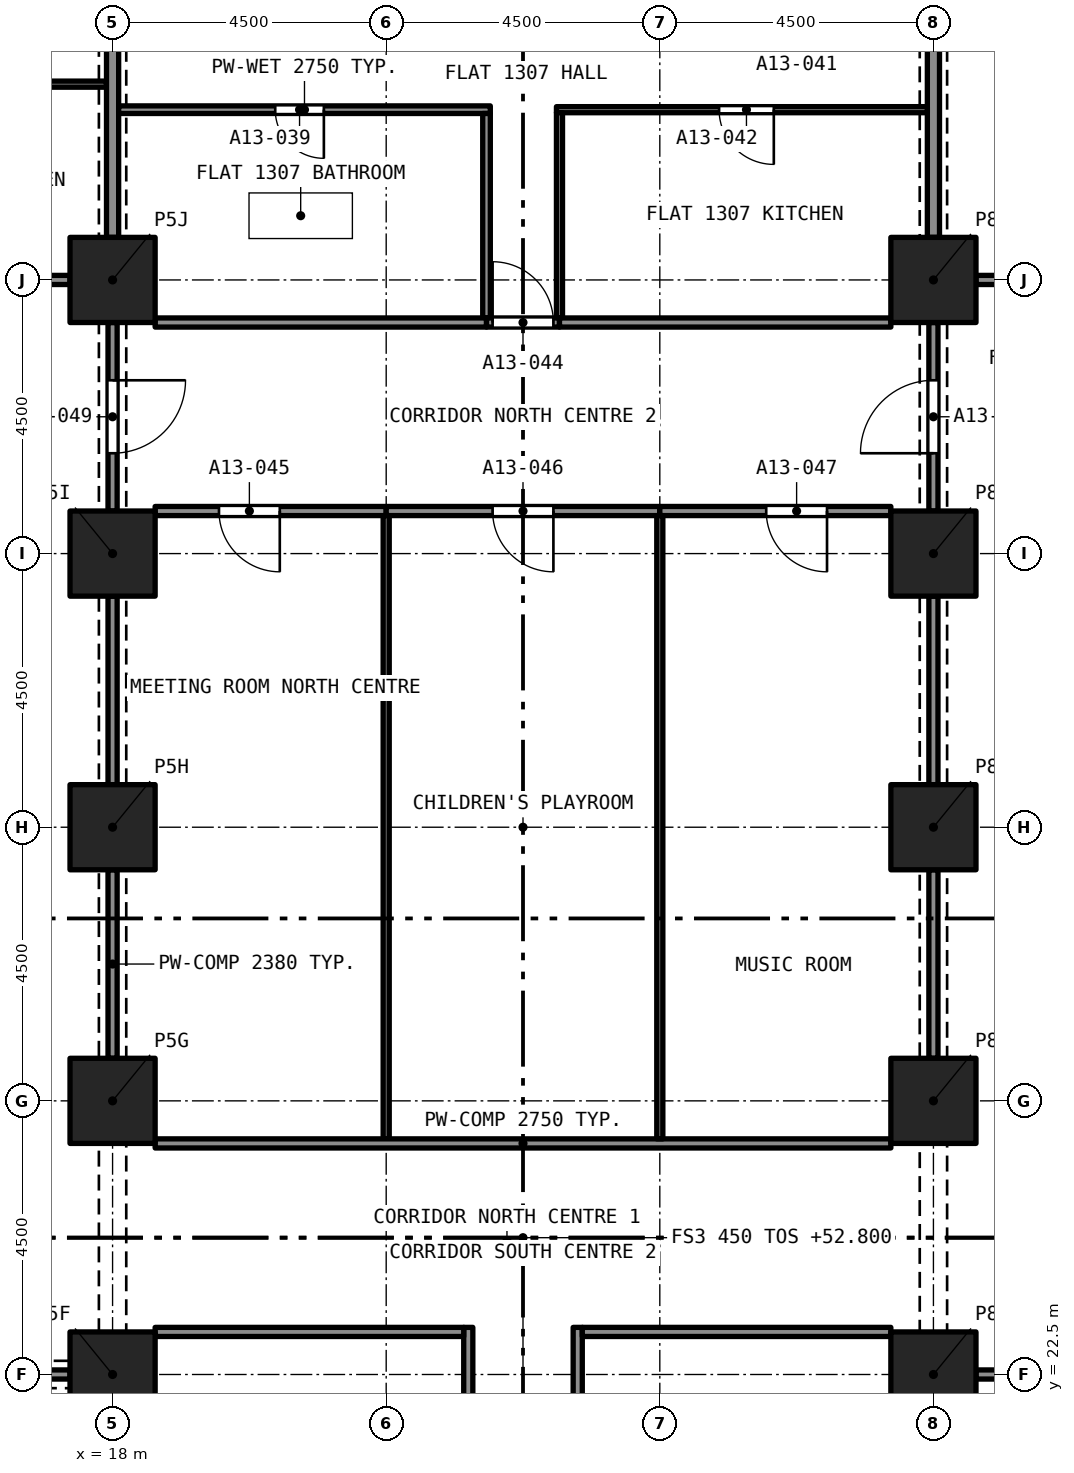
"""IFC4 building model, lengths in metres.
Left out: names, types, materials, properties, quantities, classifications, styles, units other than length and angle.
Written with IfcOpenShell. Run it as: python <this file> out.ifc"""

import sys

from ifc_helpers import new_model, si_unit, direction, frame, frame_2d, origin, origin_2d, place, context, subcontext, project, spatial, rectangle, extrude, element, fill, save


model = new_model("IFC4")
c1 = context("Model", 3, precision=1e-05, world=origin(), true_north=direction((0.0, 1.0)))
c2 = subcontext(c1, "Body", "Model", "MODEL_VIEW")
j1 = project(units=[si_unit("LENGTHUNIT", "METRE"), si_unit("PLANEANGLEUNIT", "RADIAN")], contexts=[c1])
p1 = place(None, origin())
s1 = spatial("IfcSite", under=j1, at=p1, CompositionType="ELEMENT")
p2 = place(p1, origin())
s2 = spatial("IfcBuilding", under=s1, at=p2, CompositionType="ELEMENT")
p3 = place(p2, frame((0.0, 0.0, 52.8)))
s3 = spatial("IfcBuildingStorey", under=s2, at=p3, CompositionType="ELEMENT", Elevation=52.8)
for number, where, z_axis, x_axis in (
    (1, (18.0, 22.5, 0.0), (0.0, 0.0, 1.0), (1.0, 0.0, 0.0)),
    (2, (31.5, 22.5, 0.0), (0.0, 0.0, 1.0), (1.0, 0.0, 0.0)),
    (3, (18.0, 27.0, 0.0), (0.0, 0.0, 1.0), (1.0, 0.0, 0.0)),
    (4, (31.5, 27.0, 0.0), (0.0, 0.0, 1.0), (1.0, 0.0, 0.0)),
    (5, (18.0, 31.5, 0.0), (0.0, 0.0, 1.0), (1.0, 0.0, 0.0)),
    (6, (31.5, 31.5, 0.0), (0.0, 0.0, 1.0), (1.0, 0.0, 0.0)),
    (7, (18.0, 36.0, 0.0), (0.0, 0.0, 1.0), (1.0, 0.0, 0.0)),
    (8, (31.5, 36.0, 0.0), (0.0, 0.0, 1.0), (1.0, 0.0, 0.0)),
    (9, (18.0, 40.5, 0.0), (0.0, 0.0, 1.0), (1.0, 0.0, 0.0)),
    (10, (31.5, 40.5, 0.0), (0.0, 0.0, 1.0), (1.0, 0.0, 0.0)),
):
    element("IfcColumn", number, at=place(p3, frame(where, z_axis=z_axis, x_axis=x_axis)), inside=s3, PredefinedType="COLUMN", context=c2, shape_type="SweptSolid", body=[
        extrude(rectangle(XDim=1.4, YDim=1.4, at=origin_2d()), origin(), (0.0, 0.0, 1.0), 3.2),
    ])
p4 = place(p3, frame((17.9, 43.72, 0.0), z_axis=(0.0, 0.0, 1.0), x_axis=(-1.0, 0.0, 0.0)))
e11 = element("IfcWall", 11, at=p4, inside=s3, PredefinedType="PARTITIONING", context=c2, shape_type="SweptSolid", body=[
    extrude(rectangle(XDim=6.255, YDim=0.1, at=frame_2d((3.127, 0.0))), origin(), (0.0, 0.0, 1.0), 2.9),
])
p5 = place(p4, frame((2.627, 0.0, 0.0)))
e12 = element("IfcOpeningElement", 12, at=p5, cuts=e11, PredefinedType="OPENING", context=c2, shape_type="SweptSolid", body=[
    extrude(rectangle(XDim=0.9, YDim=2.1, at=frame_2d((0.45, 1.05))), frame((0.0, 0.06, 0.0), z_axis=(0.0, -1.0, 0.0), x_axis=(1.0, 0.0, 0.0)), (0.0, 0.0, 1.0), 0.12),
])
p6 = place(p3, frame((18.0, 41.2, 0.0), z_axis=(0.0, 0.0, 1.0), x_axis=(0.0, 1.0, 0.0)))
e13 = element("IfcWall", 13, at=p6, inside=s3, PredefinedType="PARTITIONING", context=c2, shape_type="SweptSolid", body=[
    extrude(rectangle(XDim=3.1, YDim=0.2, at=frame_2d((1.55, 0.0))), origin(), (0.0, 0.0, 1.0), 2.38),
])
p7 = place(p3, frame((13.5, 40.5, 0.0), z_axis=(0.0, 0.0, 1.0), x_axis=(1.0, 0.0, 0.0)))
e14 = element("IfcWall", 14, at=p7, inside=s3, PredefinedType="PARTITIONING", context=c2, shape_type="SweptSolid", body=[
    extrude(rectangle(XDim=3.8, YDim=0.15, at=frame_2d((1.9, 0.0))), origin(), (0.0, 0.0, 1.0), 2.9),
])
p8 = place(p3, frame((31.5, 41.2, 0.0), z_axis=(0.0, 0.0, 1.0), x_axis=(0.0, 1.0, 0.0)))
e15 = element("IfcWall", 15, at=p8, inside=s3, PredefinedType="PARTITIONING", context=c2, shape_type="SweptSolid", body=[
    extrude(rectangle(XDim=3.1, YDim=0.2, at=frame_2d((1.55, 0.0))), origin(), (0.0, 0.0, 1.0), 2.38),
])
p9 = place(p3, frame((32.2, 40.5, 0.0), z_axis=(0.0, 0.0, 1.0), x_axis=(1.0, 0.0, 0.0)))
e16 = element("IfcWall", 16, at=p9, inside=s3, PredefinedType="PARTITIONING", context=c2, shape_type="SweptSolid", body=[
    extrude(rectangle(XDim=2.15, YDim=0.15, at=frame_2d((1.075, 0.0))), origin(), (0.0, 0.0, 1.0), 2.9),
])
p10 = place(p9, frame((1.02, 0.0, 0.0)))
e17 = element("IfcOpeningElement", 17, at=p10, cuts=e16, PredefinedType="OPENING", context=c2, shape_type="SweptSolid", body=[
    extrude(rectangle(XDim=1.0, YDim=2.1, at=frame_2d((0.5, 1.05))), frame((0.0, 0.085, 0.0), z_axis=(0.0, -1.0, 0.0), x_axis=(1.0, 0.0, 0.0)), (0.0, 0.0, 1.0), 0.17),
])
p11 = place(p3, frame((24.212, 43.3, 0.0), z_axis=(0.0, 0.0, 1.0), x_axis=(-1.0, 0.0, 0.0)))
e18 = element("IfcWall", 18, at=p11, inside=s3, PredefinedType="PARTITIONING", context=c2, shape_type="SweptSolid", body=[
    extrude(rectangle(XDim=6.112, YDim=0.125, at=frame_2d((3.056, 0.0))), origin(), (0.0, 0.0, 1.0), 2.75),
])
p12 = place(p11, frame((2.738, 0.0, 0.0)))
e19 = element("IfcOpeningElement", 19, at=p12, cuts=e18, PredefinedType="OPENING", context=c2, shape_type="SweptSolid", body=[
    extrude(rectangle(XDim=0.8, YDim=2.1, at=frame_2d((0.4, 1.05))), frame((0.0, 0.073, 0.0), z_axis=(0.0, -1.0, 0.0), x_axis=(1.0, 0.0, 0.0)), (0.0, 0.0, 1.0), 0.145),
])
p13 = place(p3, frame((24.15, 39.875, 0.0), z_axis=(0.0, 0.0, 1.0), x_axis=(0.0, 1.0, 0.0)))
e20 = element("IfcWall", 20, at=p13, inside=s3, PredefinedType="PARTITIONING", context=c2, shape_type="SweptSolid", body=[
    extrude(rectangle(XDim=3.363, YDim=0.125, at=frame_2d((1.681, 0.0))), origin(), (0.0, 0.0, 1.0), 2.75),
])
p14 = place(p3, frame((18.7, 39.8, 0.0), z_axis=(0.0, 0.0, 1.0), x_axis=(1.0, 0.0, 0.0)))
e21 = element("IfcWall", 21, at=p14, inside=s3, PredefinedType="PARTITIONING", context=c2, shape_type="SweptSolid", body=[
    extrude(rectangle(XDim=5.45, YDim=0.15, at=frame_2d((2.725, 0.0))), origin(), (0.0, 0.0, 1.0), 2.75),
])
p15 = place(p3, frame((31.4, 43.3, 0.0), z_axis=(0.0, 0.0, 1.0), x_axis=(-1.0, 0.0, 0.0)))
e22 = element("IfcWall", 22, at=p15, inside=s3, PredefinedType="PARTITIONING", context=c2, shape_type="SweptSolid", body=[
    extrude(rectangle(XDim=6.1, YDim=0.1, at=frame_2d((3.05, 0.0))), origin(), (0.0, 0.0, 1.0), 2.75),
])
p16 = place(p15, frame((2.525, 0.0, 0.0)))
e23 = element("IfcOpeningElement", 23, at=p16, cuts=e22, PredefinedType="OPENING", context=c2, shape_type="SweptSolid", body=[
    extrude(rectangle(XDim=0.9, YDim=2.1, at=frame_2d((0.45, 1.05))), frame((0.0, 0.06, 0.0), z_axis=(0.0, -1.0, 0.0), x_axis=(1.0, 0.0, 0.0)), (0.0, 0.0, 1.0), 0.12),
])
p17 = place(p3, frame((25.35, 39.875, 0.0), z_axis=(0.0, 0.0, 1.0), x_axis=(0.0, 1.0, 0.0)))
e24 = element("IfcWall", 24, at=p17, inside=s3, PredefinedType="PARTITIONING", context=c2, shape_type="SweptSolid", body=[
    extrude(rectangle(XDim=3.375, YDim=0.1, at=frame_2d((1.688, 0.0))), origin(), (0.0, 0.0, 1.0), 2.75),
])
p18 = place(p3, frame((24.15, 39.8, 0.0), z_axis=(0.0, 0.0, 1.0), x_axis=(1.0, 0.0, 0.0)))
e25 = element("IfcWall", 25, at=p18, inside=s3, PredefinedType="PARTITIONING", context=c2, shape_type="SweptSolid", body=[
    extrude(rectangle(XDim=1.2, YDim=0.15, at=frame_2d((0.6, 0.0))), origin(), (0.0, 0.0, 1.0), 2.75),
])
p19 = place(p18, frame((0.1, 0.0, 0.0)))
e26 = element("IfcOpeningElement", 26, at=p19, cuts=e25, PredefinedType="OPENING", context=c2, shape_type="SweptSolid", body=[
    extrude(rectangle(XDim=1.0, YDim=2.1, at=frame_2d((0.5, 1.05))), frame((0.0, 0.085, 0.0), z_axis=(0.0, -1.0, 0.0), x_axis=(1.0, 0.0, 0.0)), (0.0, 0.0, 1.0), 0.17),
])
p20 = place(p3, frame((25.35, 39.8, 0.0), z_axis=(0.0, 0.0, 1.0), x_axis=(1.0, 0.0, 0.0)))
e27 = element("IfcWall", 27, at=p20, inside=s3, PredefinedType="PARTITIONING", context=c2, shape_type="SweptSolid", body=[
    extrude(rectangle(XDim=5.45, YDim=0.15, at=frame_2d((2.725, 0.0))), origin(), (0.0, 0.0, 1.0), 2.75),
])
p21 = place(p3, frame((22.5, 36.7, 0.0), z_axis=(0.0, 0.0, 1.0), x_axis=(-1.0, 0.0, 0.0)))
e28 = element("IfcWall", 28, at=p21, inside=s3, PredefinedType="PARTITIONING", context=c2, shape_type="SweptSolid", body=[
    extrude(rectangle(XDim=3.8, YDim=0.15, at=frame_2d((1.9, 0.0))), origin(), (0.0, 0.0, 1.0), 2.75),
])
p22 = place(p21, frame((1.75, 0.0, 0.0)))
e29 = element("IfcOpeningElement", 29, at=p22, cuts=e28, PredefinedType="OPENING", context=c2, shape_type="SweptSolid", body=[
    extrude(rectangle(XDim=1.0, YDim=2.1, at=frame_2d((0.5, 1.05))), frame((0.0, 0.085, 0.0), z_axis=(0.0, -1.0, 0.0), x_axis=(1.0, 0.0, 0.0)), (0.0, 0.0, 1.0), 0.17),
])
p23 = place(p3, frame((27.0, 36.7, 0.0), z_axis=(0.0, 0.0, 1.0), x_axis=(-1.0, 0.0, 0.0)))
e30 = element("IfcWall", 30, at=p23, inside=s3, PredefinedType="PARTITIONING", context=c2, shape_type="SweptSolid", body=[
    extrude(rectangle(XDim=4.5, YDim=0.15, at=frame_2d((2.25, 0.0))), origin(), (0.0, 0.0, 1.0), 2.75),
])
p24 = place(p23, frame((1.75, 0.0, 0.0)))
e31 = element("IfcOpeningElement", 31, at=p24, cuts=e30, PredefinedType="OPENING", context=c2, shape_type="SweptSolid", body=[
    extrude(rectangle(XDim=1.0, YDim=2.1, at=frame_2d((0.5, 1.05))), frame((0.0, 0.085, 0.0), z_axis=(0.0, -1.0, 0.0), x_axis=(1.0, 0.0, 0.0)), (0.0, 0.0, 1.0), 0.17),
])
p25 = place(p3, frame((30.8, 36.7, 0.0), z_axis=(0.0, 0.0, 1.0), x_axis=(-1.0, 0.0, 0.0)))
e32 = element("IfcWall", 32, at=p25, inside=s3, PredefinedType="PARTITIONING", context=c2, shape_type="SweptSolid", body=[
    extrude(rectangle(XDim=3.8, YDim=0.15, at=frame_2d((1.9, 0.0))), origin(), (0.0, 0.0, 1.0), 2.75),
])
p26 = place(p25, frame((1.05, 0.0, 0.0)))
e33 = element("IfcOpeningElement", 33, at=p26, cuts=e32, PredefinedType="OPENING", context=c2, shape_type="SweptSolid", body=[
    extrude(rectangle(XDim=1.0, YDim=2.1, at=frame_2d((0.5, 1.05))), frame((0.0, 0.085, 0.0), z_axis=(0.0, -1.0, 0.0), x_axis=(1.0, 0.0, 0.0)), (0.0, 0.0, 1.0), 0.17),
])
p27 = place(p3, frame((31.5, 36.7, 0.0), z_axis=(0.0, 0.0, 1.0), x_axis=(0.0, 1.0, 0.0)))
e34 = element("IfcWall", 34, at=p27, inside=s3, PredefinedType="PARTITIONING", context=c2, shape_type="SweptSolid", body=[
    extrude(rectangle(XDim=3.1, YDim=0.15, at=frame_2d((1.55, 0.0))), origin(), (0.0, 0.0, 1.0), 2.38),
])
p28 = place(p27, frame((0.95, 0.0, 0.0)))
e35 = element("IfcOpeningElement", 35, at=p28, cuts=e34, PredefinedType="OPENING", context=c2, shape_type="SweptSolid", body=[
    extrude(rectangle(XDim=1.2, YDim=2.1, at=frame_2d((0.6, 1.05))), frame((0.0, 0.085, 0.0), z_axis=(0.0, -1.0, 0.0), x_axis=(1.0, 0.0, 0.0)), (0.0, 0.0, 1.0), 0.17),
])
p29 = place(p3, frame((18.0, 39.8, 0.0), z_axis=(0.0, 0.0, 1.0), x_axis=(0.0, -1.0, 0.0)))
e36 = element("IfcWall", 36, at=p29, inside=s3, PredefinedType="PARTITIONING", context=c2, shape_type="SweptSolid", body=[
    extrude(rectangle(XDim=3.1, YDim=0.15, at=frame_2d((1.55, 0.0))), origin(), (0.0, 0.0, 1.0), 2.38),
])
p30 = place(p29, frame((0.95, 0.0, 0.0)))
e37 = element("IfcOpeningElement", 37, at=p30, cuts=e36, PredefinedType="OPENING", context=c2, shape_type="SweptSolid", body=[
    extrude(rectangle(XDim=1.2, YDim=2.1, at=frame_2d((0.6, 1.05))), frame((0.0, 0.085, 0.0), z_axis=(0.0, -1.0, 0.0), x_axis=(1.0, 0.0, 0.0)), (0.0, 0.0, 1.0), 0.17),
])
p31 = place(p3, frame((23.85, 17.225, 0.0), z_axis=(0.0, 0.0, 1.0), x_axis=(0.0, 1.0, 0.0)))
e38 = element("IfcWall", 38, at=p31, inside=s3, PredefinedType="PARTITIONING", context=c2, shape_type="SweptSolid", body=[
    extrude(rectangle(XDim=6.05, YDim=0.15, at=frame_2d((3.025, 0.0))), origin(), (0.0, 0.0, 1.0), 2.75),
])
p32 = place(p31, frame((2.525, 0.0, 0.0)))
e39 = element("IfcOpeningElement", 39, at=p32, cuts=e38, PredefinedType="OPENING", context=c2, shape_type="SweptSolid", body=[
    extrude(rectangle(XDim=1.0, YDim=2.1, at=frame_2d((0.5, 1.05))), frame((0.0, 0.085, 0.0), z_axis=(0.0, -1.0, 0.0), x_axis=(1.0, 0.0, 0.0)), (0.0, 0.0, 1.0), 0.17),
])
p33 = place(p3, frame((25.65, 23.275, 0.0), z_axis=(0.0, 0.0, 1.0), x_axis=(0.0, -1.0, 0.0)))
e40 = element("IfcWall", 40, at=p33, inside=s3, PredefinedType="PARTITIONING", context=c2, shape_type="SweptSolid", body=[
    extrude(rectangle(XDim=6.05, YDim=0.15, at=frame_2d((3.025, 0.0))), origin(), (0.0, 0.0, 1.0), 2.75),
])
p34 = place(p33, frame((2.525, 0.0, 0.0)))
e41 = element("IfcOpeningElement", 41, at=p34, cuts=e40, PredefinedType="OPENING", context=c2, shape_type="SweptSolid", body=[
    extrude(rectangle(XDim=1.0, YDim=2.1, at=frame_2d((0.5, 1.05))), frame((0.0, 0.085, 0.0), z_axis=(0.0, -1.0, 0.0), x_axis=(1.0, 0.0, 0.0)), (0.0, 0.0, 1.0), 0.17),
])
p35 = place(p3, frame((22.5, 26.375, 0.0), z_axis=(0.0, 0.0, 1.0), x_axis=(0.0, 1.0, 0.0)))
e42 = element("IfcWall", 42, at=p35, inside=s3, PredefinedType="PARTITIONING", context=c2, shape_type="SweptSolid", body=[
    extrude(rectangle(XDim=10.25, YDim=0.1, at=frame_2d((5.125, 0.0))), origin(), (0.0, 0.0, 1.0), 2.75),
])
for number, where, z_axis, x_axis in (
    (43, (18.0, 27.7, 0.0), (0.0, 0.0, 1.0), (0.0, 1.0, 0.0)),
    (44, (18.0, 32.2, 0.0), (0.0, 0.0, 1.0), (0.0, 1.0, 0.0)),
):
    element("IfcWall", number, at=place(p3, frame(where, z_axis=z_axis, x_axis=x_axis)), inside=s3, PredefinedType="PARTITIONING", context=c2, shape_type="SweptSolid", body=[
        extrude(rectangle(XDim=3.1, YDim=0.15, at=frame_2d((1.55, 0.0))), origin(), (0.0, 0.0, 1.0), 2.38),
    ])
p36 = place(p3, frame((18.7, 26.3, 0.0), z_axis=(0.0, 0.0, 1.0), x_axis=(1.0, 0.0, 0.0)))
e45 = element("IfcWall", 45, at=p36, inside=s3, PredefinedType="PARTITIONING", context=c2, shape_type="SweptSolid", body=[
    extrude(rectangle(XDim=12.1, YDim=0.15, at=frame_2d((6.05, 0.0))), origin(), (0.0, 0.0, 1.0), 2.75),
])
p37 = place(p3, frame((27.0, 26.375, 0.0), z_axis=(0.0, 0.0, 1.0), x_axis=(0.0, 1.0, 0.0)))
e46 = element("IfcWall", 46, at=p37, inside=s3, PredefinedType="PARTITIONING", context=c2, shape_type="SweptSolid", body=[
    extrude(rectangle(XDim=10.25, YDim=0.1, at=frame_2d((5.125, 0.0))), origin(), (0.0, 0.0, 1.0), 2.75),
])
for number, where, z_axis, x_axis in (
    (47, (31.5, 32.2, 0.0), (0.0, 0.0, 1.0), (0.0, 1.0, 0.0)),
    (48, (31.5, 27.7, 0.0), (0.0, 0.0, 1.0), (0.0, 1.0, 0.0)),
):
    element("IfcWall", number, at=place(p3, frame(where, z_axis=z_axis, x_axis=x_axis)), inside=s3, PredefinedType="PARTITIONING", context=c2, shape_type="SweptSolid", body=[
        extrude(rectangle(XDim=3.1, YDim=0.15, at=frame_2d((1.55, 0.0))), origin(), (0.0, 0.0, 1.0), 2.38),
    ])
for number, where, z_axis, x_axis in (
    (49, (18.7, 23.2, 0.0), (0.0, 0.0, 1.0), (1.0, 0.0, 0.0)),
    (50, (25.725, 23.2, 0.0), (0.0, 0.0, 1.0), (1.0, 0.0, 0.0)),
):
    element("IfcWall", number, at=place(p3, frame(where, z_axis=z_axis, x_axis=x_axis)), inside=s3, PredefinedType="PARTITIONING", context=c2, shape_type="SweptSolid", body=[
        extrude(rectangle(XDim=5.075, YDim=0.15, at=frame_2d((2.538, 0.0))), origin(), (0.0, 0.0, 1.0), 2.75),
    ])
p38 = place(p3, frame((32.2, 22.5, 0.0), z_axis=(0.0, 0.0, 1.0), x_axis=(1.0, 0.0, 0.0)))
e51 = element("IfcWall", 51, at=p38, inside=s3, PredefinedType="PARTITIONING", context=c2, shape_type="SweptSolid", body=[
    extrude(rectangle(XDim=9.725, YDim=0.15, at=frame_2d((4.863, 0.0))), origin(), (0.0, 0.0, 1.0), 2.9),
])
p39 = place(p3, frame((14.2, 22.5, 0.0), z_axis=(0.0, 0.0, 1.0), x_axis=(1.0, 0.0, 0.0)))
e52 = element("IfcWall", 52, at=p39, inside=s3, PredefinedType="PARTITIONING", context=c2, shape_type="SweptSolid", body=[
    extrude(rectangle(XDim=3.1, YDim=0.15, at=frame_2d((1.55, 0.0))), origin(), (0.0, 0.0, 1.0), 2.38),
])
p40 = place(p12, origin())
e53 = element("IfcDoor", 53, at=p40, inside=s3, OperationType="SINGLE_SWING_RIGHT", PredefinedType="DOOR", context=c2, shape_type="SweptSolid", body=[
    extrude(rectangle(XDim=0.8, YDim=2.1, at=frame_2d((0.4, 1.05))), frame((0.0, 0.025, 0.0), z_axis=(0.0, -1.0, 0.0), x_axis=(1.0, 0.0, 0.0)), (0.0, 0.0, 1.0), 0.05),
])
fill(e19, e53)
p41 = place(p16, origin())
e54 = element("IfcDoor", 54, at=p41, inside=s3, OperationType="SINGLE_SWING_LEFT", PredefinedType="DOOR", context=c2, shape_type="SweptSolid", body=[
    extrude(rectangle(XDim=0.9, YDim=2.1, at=frame_2d((0.45, 1.05))), frame((0.0, 0.025, 0.0), z_axis=(0.0, -1.0, 0.0), x_axis=(1.0, 0.0, 0.0)), (0.0, 0.0, 1.0), 0.05),
])
fill(e23, e54)
p42 = place(p19, origin())
e55 = element("IfcDoor", 55, at=p42, inside=s3, OperationType="SINGLE_SWING_RIGHT", PredefinedType="DOOR", context=c2, shape_type="SweptSolid", body=[
    extrude(rectangle(XDim=1.0, YDim=2.1, at=frame_2d((0.5, 1.05))), frame((0.0, 0.025, 0.0), z_axis=(0.0, -1.0, 0.0), x_axis=(1.0, 0.0, 0.0)), (0.0, 0.0, 1.0), 0.05),
])
fill(e26, e55)
p43 = place(p22, origin())
e56 = element("IfcDoor", 56, at=p43, inside=s3, OperationType="SINGLE_SWING_RIGHT", PredefinedType="DOOR", context=c2, shape_type="SweptSolid", body=[
    extrude(rectangle(XDim=1.0, YDim=2.1, at=frame_2d((0.5, 1.05))), frame((0.0, 0.025, 0.0), z_axis=(0.0, -1.0, 0.0), x_axis=(1.0, 0.0, 0.0)), (0.0, 0.0, 1.0), 0.05),
])
fill(e29, e56)
p44 = place(p24, origin())
e57 = element("IfcDoor", 57, at=p44, inside=s3, OperationType="SINGLE_SWING_RIGHT", PredefinedType="DOOR", context=c2, shape_type="SweptSolid", body=[
    extrude(rectangle(XDim=1.0, YDim=2.1, at=frame_2d((0.5, 1.05))), frame((0.0, 0.025, 0.0), z_axis=(0.0, -1.0, 0.0), x_axis=(1.0, 0.0, 0.0)), (0.0, 0.0, 1.0), 0.05),
])
fill(e31, e57)
p45 = place(p26, origin())
e58 = element("IfcDoor", 58, at=p45, inside=s3, OperationType="SINGLE_SWING_LEFT", PredefinedType="DOOR", context=c2, shape_type="SweptSolid", body=[
    extrude(rectangle(XDim=1.0, YDim=2.1, at=frame_2d((0.5, 1.05))), frame((0.0, 0.025, 0.0), z_axis=(0.0, -1.0, 0.0), x_axis=(1.0, 0.0, 0.0)), (0.0, 0.0, 1.0), 0.05),
])
fill(e33, e58)
p46 = place(p28, origin())
e59 = element("IfcDoor", 59, at=p46, inside=s3, OperationType="SINGLE_SWING_LEFT", PredefinedType="DOOR", context=c2, shape_type="SweptSolid", body=[
    extrude(rectangle(XDim=1.2, YDim=2.1, at=frame_2d((0.6, 1.05))), frame((0.0, 0.025, 0.0), z_axis=(0.0, -1.0, 0.0), x_axis=(1.0, 0.0, 0.0)), (0.0, 0.0, 1.0), 0.05),
])
fill(e35, e59)
p47 = place(p30, origin())
e60 = element("IfcDoor", 60, at=p47, inside=s3, OperationType="SINGLE_SWING_LEFT", PredefinedType="DOOR", context=c2, shape_type="SweptSolid", body=[
    extrude(rectangle(XDim=1.2, YDim=2.1, at=frame_2d((0.6, 1.05))), frame((0.0, 0.025, 0.0), z_axis=(0.0, -1.0, 0.0), x_axis=(1.0, 0.0, 0.0)), (0.0, 0.0, 1.0), 0.05),
])
fill(e37, e60)
save(model, sys.argv[1])
